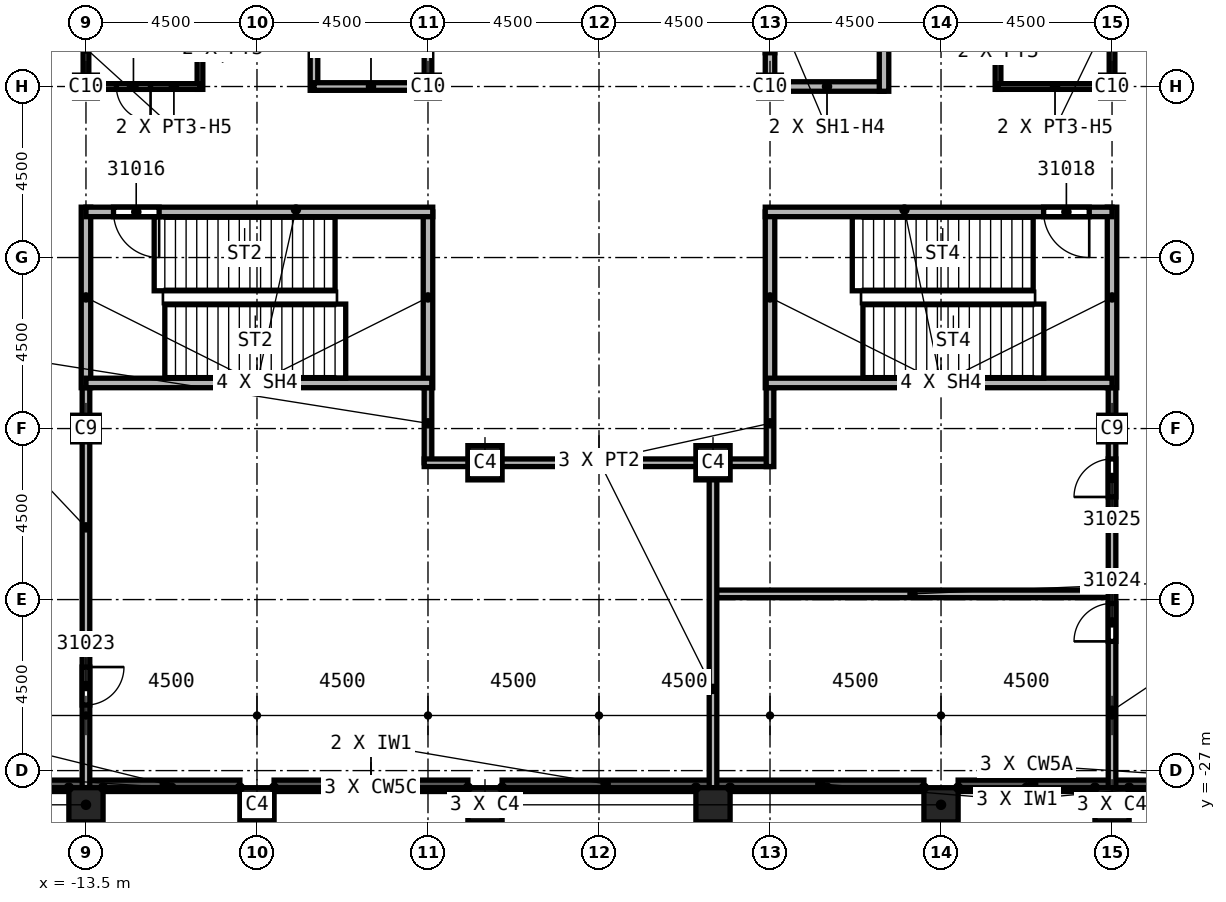
"""IFC4 building model, lengths in metres.
Left out: names, types, materials, properties, quantities, classifications, styles, units other than length and angle.
Written with IfcOpenShell. Run it as: python <this file> out.ifc"""

import sys

from ifc_helpers import new_model, si_unit, direction, frame, frame_2d, origin, origin_2d, place, context, subcontext, project, spatial, rectangle, extrude, element, fill, save


model = new_model("IFC4")
c1 = context("Model", 3, precision=1e-05, world=origin(), true_north=direction((0.0, 1.0)))
c2 = subcontext(c1, "Body", "Model", "MODEL_VIEW")
j1 = project(units=[si_unit("LENGTHUNIT", "METRE"), si_unit("PLANEANGLEUNIT", "RADIAN")], contexts=[c1])
p1 = place(None, origin())
s1 = spatial("IfcSite", under=j1, at=p1, CompositionType="ELEMENT")
p2 = place(p1, origin())
s2 = spatial("IfcBuilding", under=s1, at=p2, CompositionType="ELEMENT")
p3 = place(p2, frame((0.0, 0.0, 350.0)))
s3 = spatial("IfcBuildingStorey", under=s2, at=p3, CompositionType="ELEMENT", Elevation=350.0)
for number, where, z_axis, x_axis in (
    (1, (13.5, -18.0, 0.0), (0.0, 0.0, 1.0), (1.0, 0.0, 0.0)),
    (2, (-13.5, -18.0, 0.0), (0.0, 0.0, 1.0), (1.0, 0.0, 0.0)),
):
    element("IfcColumn", number, at=place(p3, frame(where, z_axis=z_axis, x_axis=x_axis)), inside=s3, PredefinedType="COLUMN", context=c2, shape_type="SweptSolid", body=[
        extrude(rectangle(XDim=0.7, YDim=0.7, at=origin_2d()), origin(), (0.0, 0.0, 1.0), 5.6),
    ])
for number, where, z_axis, x_axis in (
    (3, (4.5, -9.0, 0.0), (0.0, 0.0, 1.0), (1.0, 0.0, 0.0)),
    (4, (13.5, -9.0, 0.0), (0.0, 0.0, 1.0), (1.0, 0.0, 0.0)),
    (5, (-4.5, -9.0, 0.0), (0.0, 0.0, 1.0), (1.0, 0.0, 0.0)),
    (6, (-13.5, -9.0, 0.0), (0.0, 0.0, 1.0), (1.0, 0.0, 0.0)),
):
    element("IfcColumn", number, at=place(p3, frame(where, z_axis=z_axis, x_axis=x_axis)), inside=s3, PredefinedType="COLUMN", context=c2, shape_type="SweptSolid", body=[
        extrude(rectangle(XDim=0.6, YDim=0.6, at=origin_2d()), origin(), (0.0, 0.0, 1.0), 5.6),
    ])
for number, where, z_axis, x_axis in (
    (7, (3.0, -27.9, 0.0), (0.0, 0.0, 1.0), (1.0, 0.0, 0.0)),
    (8, (9.0, -27.9, 0.0), (0.0, 0.0, 1.0), (1.0, 0.0, 0.0)),
    (9, (13.5, -27.9, 0.0), (0.0, 0.0, 1.0), (1.0, 0.0, 0.0)),
    (10, (-3.0, -27.9, 0.0), (0.0, 0.0, 1.0), (1.0, 0.0, 0.0)),
    (11, (-9.0, -27.9, 0.0), (0.0, 0.0, 1.0), (1.0, 0.0, 0.0)),
    (12, (-13.5, -27.9, 0.0), (0.0, 0.0, 1.0), (1.0, 0.0, 0.0)),
    (13, (3.0, -18.9, 0.0), (0.0, 0.0, 1.0), (1.0, 0.0, 0.0)),
    (14, (-3.0, -18.9, 0.0), (0.0, 0.0, 1.0), (1.0, 0.0, 0.0)),
):
    element("IfcColumn", number, at=place(p3, frame(where, z_axis=z_axis, x_axis=x_axis)), inside=s3, PredefinedType="COLUMN", context=c2, shape_type="SweptSolid", body=[
        extrude(rectangle(XDim=0.9, YDim=0.9, at=origin_2d()), origin(), (0.0, 0.0, 1.0), 5.6),
    ])
for number, where, z_axis, x_axis in (
    (15, (-17.55, -27.4, 0.0), (0.0, 0.0, 1.0), (1.0, 0.0, 0.0)),
    (16, (-13.45, -27.4, 0.0), (0.0, 0.0, 1.0), (1.0, 0.0, 0.0)),
):
    element("IfcWall", number, at=place(p3, frame(where, z_axis=z_axis, x_axis=x_axis)), inside=s3, PredefinedType="SOLIDWALL", context=c2, shape_type="SweptSolid", body=[
        extrude(rectangle(XDim=4.0, YDim=0.3, at=frame_2d((2.0, 0.0))), origin(), (0.0, 0.0, 1.0), 1.1),
    ])
p4 = place(p3, frame((-8.55, -27.4, 0.0), z_axis=(0.0, 0.0, 1.0), x_axis=(1.0, 0.0, 0.0)))
e17 = element("IfcWall", 17, at=p4, inside=s3, PredefinedType="SOLIDWALL", context=c2, shape_type="SweptSolid", body=[
    extrude(rectangle(XDim=5.1, YDim=0.3, at=frame_2d((2.55, 0.0))), origin(), (0.0, 0.0, 1.0), 1.1),
])
for number, where, z_axis, x_axis in (
    (18, (-2.55, -27.4, 0.0), (0.0, 0.0, 1.0), (1.0, 0.0, 0.0)),
    (19, (3.05, -27.4, 0.0), (0.0, 0.0, 1.0), (1.0, 0.0, 0.0)),
):
    element("IfcWall", number, at=place(p3, frame(where, z_axis=z_axis, x_axis=x_axis)), inside=s3, PredefinedType="SOLIDWALL", context=c2, shape_type="SweptSolid", body=[
        extrude(rectangle(XDim=5.5, YDim=0.3, at=frame_2d((2.75, 0.0))), origin(), (0.0, 0.0, 1.0), 1.1),
    ])
for number, where, z_axis, x_axis in (
    (20, (9.45, -27.4, 0.0), (0.0, 0.0, 1.0), (1.0, 0.0, 0.0)),
    (21, (13.55, -27.4, 0.0), (0.0, 0.0, 1.0), (1.0, 0.0, 0.0)),
):
    element("IfcWall", number, at=place(p3, frame(where, z_axis=z_axis, x_axis=x_axis)), inside=s3, PredefinedType="SOLIDWALL", context=c2, shape_type="SweptSolid", body=[
        extrude(rectangle(XDim=4.0, YDim=0.3, at=frame_2d((2.0, 0.0))), origin(), (0.0, 0.0, 1.0), 1.1),
    ])
p5 = place(p3, frame((-13.5, -16.675, 0.0), z_axis=(0.0, 0.0, 1.0), x_axis=(0.0, -1.0, 0.0)))
e22 = element("IfcWall", 22, at=p5, inside=s3, PredefinedType="PARTITIONING", context=c2, shape_type="SweptSolid", body=[
    extrude(rectangle(XDim=10.775, YDim=0.2, at=frame_2d((5.387, 0.0))), origin(), (0.0, 0.0, 1.0), 5.6),
])
p6 = place(p5, frame((7.6, 0.0, 0.0)))
e23 = element("IfcOpeningElement", 23, at=p6, cuts=e22, PredefinedType="OPENING", context=c2, shape_type="SweptSolid", body=[
    extrude(rectangle(XDim=1.0, YDim=2.1, at=frame_2d((0.5, 1.05))), frame((0.0, 0.1, 0.0), z_axis=(0.0, -1.0, 0.0), x_axis=(1.0, 0.0, 0.0)), (0.0, 0.0, 1.0), 0.2),
])
p7 = place(p3, frame((-4.5, -18.9, 0.0), z_axis=(0.0, 0.0, 1.0), x_axis=(0.0, 1.0, 0.0)))
e24 = element("IfcWall", 24, at=p7, inside=s3, PredefinedType="PARTITIONING", context=c2, shape_type="SweptSolid", body=[
    extrude(rectangle(XDim=2.1, YDim=0.2, at=frame_2d((1.05, 0.0))), origin(), (0.0, 0.0, 1.0), 5.6),
])
p8 = place(p3, frame((4.5, -18.9, 0.0), z_axis=(0.0, 0.0, 1.0), x_axis=(-1.0, 0.0, 0.0)))
e25 = element("IfcWall", 25, at=p8, inside=s3, PredefinedType="PARTITIONING", context=c2, shape_type="SweptSolid", body=[
    extrude(rectangle(XDim=9.1, YDim=0.2, at=frame_2d((4.55, 0.0))), origin(), (0.0, 0.0, 1.0), 5.6),
])
p9 = place(p3, frame((3.0, -22.35, 0.0), z_axis=(0.0, 0.0, 1.0), x_axis=(1.0, 0.0, 0.0)))
e26 = element("IfcWall", 26, at=p9, inside=s3, PredefinedType="PARTITIONING", context=c2, shape_type="SweptSolid", body=[
    extrude(rectangle(XDim=10.5, YDim=0.2, at=frame_2d((5.25, 0.0))), origin(), (0.0, 0.0, 1.0), 5.6),
])
p10 = place(p3, frame((3.0, -18.9, 0.0), z_axis=(0.0, 0.0, 1.0), x_axis=(0.0, -1.0, 0.0)))
e27 = element("IfcWall", 27, at=p10, inside=s3, PredefinedType="PARTITIONING", context=c2, shape_type="SweptSolid", body=[
    extrude(rectangle(XDim=8.55, YDim=0.2, at=frame_2d((4.275, 0.0))), origin(), (0.0, 0.0, 1.0), 5.6),
])
p11 = place(p3, frame((4.5, -16.8, 0.0), z_axis=(0.0, 0.0, 1.0), x_axis=(0.0, -1.0, 0.0)))
e28 = element("IfcWall", 28, at=p11, inside=s3, PredefinedType="PARTITIONING", context=c2, shape_type="SweptSolid", body=[
    extrude(rectangle(XDim=2.2, YDim=0.2, at=frame_2d((1.1, 0.0))), origin(), (0.0, 0.0, 1.0), 5.6),
])
p12 = place(p3, frame((13.5, -27.45, 0.0), z_axis=(0.0, 0.0, 1.0), x_axis=(0.0, 1.0, 0.0)))
e29 = element("IfcWall", 29, at=p12, inside=s3, PredefinedType="PARTITIONING", context=c2, shape_type="SweptSolid", body=[
    extrude(rectangle(XDim=10.775, YDim=0.2, at=frame_2d((5.387, 0.0))), origin(), (0.0, 0.0, 1.0), 5.6),
])
p13 = place(p12, frame((3.85, 0.0, 0.0)))
e30 = element("IfcOpeningElement", 30, at=p13, cuts=e29, PredefinedType="OPENING", context=c2, shape_type="SweptSolid", body=[
    extrude(rectangle(XDim=1.0, YDim=2.1, at=frame_2d((0.5, 1.05))), frame((0.0, 0.1, 0.0), z_axis=(0.0, -1.0, 0.0), x_axis=(1.0, 0.0, 0.0)), (0.0, 0.0, 1.0), 0.2),
])
p14 = place(p12, frame((7.65, 0.0, 0.0)))
e31 = element("IfcOpeningElement", 31, at=p14, cuts=e29, PredefinedType="OPENING", context=c2, shape_type="SweptSolid", body=[
    extrude(rectangle(XDim=1.0, YDim=2.1, at=frame_2d((0.5, 1.05))), frame((0.0, 0.1, 0.0), z_axis=(0.0, -1.0, 0.0), x_axis=(1.0, 0.0, 0.0)), (0.0, 0.0, 1.0), 0.2),
])
p15 = place(p3, frame((-7.5, -9.1, 0.0), z_axis=(0.0, 0.0, 1.0), x_axis=(0.0, 1.0, 0.0)))
e32 = element("IfcWall", 32, at=p15, inside=s3, PredefinedType="SOLIDWALL", context=c2, shape_type="SweptSolid", body=[
    extrude(rectangle(XDim=6.225, YDim=0.2, at=frame_2d((3.113, 0.0))), origin(), (0.0, 0.0, 1.0), 5.6),
])
p16 = place(p3, frame((-4.5, -9.0, 0.0), z_axis=(0.0, 0.0, 1.0), x_axis=(-1.0, 0.0, 0.0)))
e33 = element("IfcWall", 33, at=p16, inside=s3, PredefinedType="SOLIDWALL", context=c2, shape_type="SweptSolid", body=[
    extrude(rectangle(XDim=3.0, YDim=0.2, at=frame_2d((1.5, 0.0))), origin(), (0.0, 0.0, 1.0), 4.838),
])
p17 = place(p3, frame((-4.5, 6.0, 0.0), z_axis=(0.0, 0.0, 1.0), x_axis=(0.0, -1.0, 0.0)))
e34 = element("IfcWall", 34, at=p17, inside=s3, PredefinedType="SOLIDWALL", context=c2, shape_type="SweptSolid", body=[
    extrude(rectangle(XDim=15.1, YDim=0.2, at=frame_2d((7.55, 0.0))), origin(), (0.0, 0.0, 1.0), 4.838),
])
p18 = place(p17, frame((7.3, 0.0, 0.0)))
e35 = element("IfcOpeningElement", 35, at=p18, cuts=e34, PredefinedType="OPENING", context=c2, shape_type="SweptSolid", body=[
    extrude(rectangle(XDim=1.1, YDim=2.1, at=frame_2d((0.55, 1.05))), frame((0.0, 0.1, 0.0), z_axis=(0.0, -1.0, 0.0), x_axis=(1.0, 0.0, 0.0)), (0.0, 0.0, 1.0), 0.2),
])
p19 = place(p17, frame((4.0, 0.0, 0.0)))
e36 = element("IfcOpeningElement", 36, at=p19, cuts=e34, PredefinedType="OPENING", context=c2, shape_type="SweptSolid", body=[
    extrude(rectangle(XDim=1.1, YDim=2.1, at=frame_2d((0.55, 1.05))), frame((0.0, 0.1, 0.0), z_axis=(0.0, -1.0, 0.0), x_axis=(1.0, 0.0, 0.0)), (0.0, 0.0, 1.0), 0.2),
])
p20 = place(p3, frame((4.5, -9.125, 0.0), z_axis=(0.0, 0.0, 1.0), x_axis=(0.0, 1.0, 0.0)))
e37 = element("IfcWall", 37, at=p20, inside=s3, PredefinedType="SOLIDWALL", context=c2, shape_type="SweptSolid", body=[
    extrude(rectangle(XDim=3.125, YDim=0.25, at=frame_2d((1.562, 0.0))), origin(), (0.0, 0.0, 1.0), 4.838),
])
p21 = place(p20, frame((1.012, 0.0, 0.0)))
e38 = element("IfcOpeningElement", 38, at=p21, cuts=e37, PredefinedType="OPENING", context=c2, shape_type="SweptSolid", body=[
    extrude(rectangle(XDim=1.1, YDim=2.1, at=frame_2d((0.55, 1.05))), frame((0.0, 0.125, 0.0), z_axis=(0.0, -1.0, 0.0), x_axis=(1.0, 0.0, 0.0)), (0.0, 0.0, 1.0), 0.25),
])
p22 = place(p3, frame((7.5, -9.0, 0.0), z_axis=(0.0, 0.0, 1.0), x_axis=(-1.0, 0.0, 0.0)))
e39 = element("IfcWall", 39, at=p22, inside=s3, PredefinedType="SOLIDWALL", context=c2, shape_type="SweptSolid", body=[
    extrude(rectangle(XDim=3.0, YDim=0.25, at=frame_2d((1.5, 0.0))), origin(), (0.0, 0.0, 1.0), 4.838),
])
p23 = place(p3, frame((7.5, -6.0, 0.0), z_axis=(0.0, 0.0, 1.0), x_axis=(0.0, -1.0, 0.0)))
e40 = element("IfcWall", 40, at=p23, inside=s3, PredefinedType="SOLIDWALL", context=c2, shape_type="SweptSolid", body=[
    extrude(rectangle(XDim=3.125, YDim=0.25, at=frame_2d((1.562, 0.0))), origin(), (0.0, 0.0, 1.0), 5.6),
])
p24 = place(p3, frame((-13.5, -12.175, 0.0), z_axis=(0.0, 0.0, 1.0), x_axis=(0.0, -1.0, 0.0)))
e41 = element("IfcWall", 41, at=p24, inside=s3, PredefinedType="SOLIDWALL", context=c2, shape_type="SweptSolid", body=[
    extrude(rectangle(XDim=4.75, YDim=0.25, at=frame_2d((2.375, 0.0))), origin(), (0.0, 0.0, 1.0), 5.6),
])
p25 = place(p3, frame((-4.5, -12.3, 0.0), z_axis=(0.0, 0.0, 1.0), x_axis=(0.0, -1.0, 0.0)))
e42 = element("IfcWall", 42, at=p25, inside=s3, PredefinedType="SOLIDWALL", context=c2, shape_type="SweptSolid", body=[
    extrude(rectangle(XDim=4.625, YDim=0.25, at=frame_2d((2.312, 0.0))), origin(), (0.0, 0.0, 1.0), 5.6),
])
p26 = place(p3, frame((-4.4, -16.8, 0.0), z_axis=(0.0, 0.0, 1.0), x_axis=(-1.0, 0.0, 0.0)))
e43 = element("IfcWall", 43, at=p26, inside=s3, PredefinedType="SOLIDWALL", context=c2, shape_type="SweptSolid", body=[
    extrude(rectangle(XDim=9.1, YDim=0.25, at=frame_2d((4.55, 0.0))), origin(), (0.0, 0.0, 1.0), 5.6),
])
p27 = place(p3, frame((-4.375, -12.3, 0.0), z_axis=(0.0, 0.0, 1.0), x_axis=(-1.0, 0.0, 0.0)))
e44 = element("IfcWall", 44, at=p27, inside=s3, PredefinedType="SOLIDWALL", context=c2, shape_type="SweptSolid", body=[
    extrude(rectangle(XDim=9.125, YDim=0.25, at=frame_2d((4.562, 0.0))), origin(), (0.0, 0.0, 1.0), 5.6),
])
p28 = place(p27, frame((7.2, 0.0, 0.0)))
e45 = element("IfcOpeningElement", 45, at=p28, cuts=e44, PredefinedType="OPENING", context=c2, shape_type="SweptSolid", body=[
    extrude(rectangle(XDim=1.2, YDim=2.1, at=frame_2d((0.6, 1.05))), frame((0.0, 0.125, 0.0), z_axis=(0.0, -1.0, 0.0), x_axis=(1.0, 0.0, 0.0)), (0.0, 0.0, 1.0), 0.25),
])
p29 = place(p3, frame((4.5, -16.925, 0.0), z_axis=(0.0, 0.0, 1.0), x_axis=(0.0, 1.0, 0.0)))
e46 = element("IfcWall", 46, at=p29, inside=s3, PredefinedType="SOLIDWALL", context=c2, shape_type="SweptSolid", body=[
    extrude(rectangle(XDim=4.625, YDim=0.25, at=frame_2d((2.312, 0.0))), origin(), (0.0, 0.0, 1.0), 5.6),
])
p30 = place(p3, frame((13.5, -16.925, 0.0), z_axis=(0.0, 0.0, 1.0), x_axis=(0.0, 1.0, 0.0)))
e47 = element("IfcWall", 47, at=p30, inside=s3, PredefinedType="SOLIDWALL", context=c2, shape_type="SweptSolid", body=[
    extrude(rectangle(XDim=4.75, YDim=0.25, at=frame_2d((2.375, 0.0))), origin(), (0.0, 0.0, 1.0), 5.6),
])
p31 = place(p3, frame((13.5, -16.8, 0.0), z_axis=(0.0, 0.0, 1.0), x_axis=(-1.0, 0.0, 0.0)))
e48 = element("IfcWall", 48, at=p31, inside=s3, PredefinedType="SOLIDWALL", context=c2, shape_type="SweptSolid", body=[
    extrude(rectangle(XDim=9.1, YDim=0.25, at=frame_2d((4.55, 0.0))), origin(), (0.0, 0.0, 1.0), 5.6),
])
p32 = place(p3, frame((13.5, -12.3, 0.0), z_axis=(0.0, 0.0, 1.0), x_axis=(-1.0, 0.0, 0.0)))
e49 = element("IfcWall", 49, at=p32, inside=s3, PredefinedType="SOLIDWALL", context=c2, shape_type="SweptSolid", body=[
    extrude(rectangle(XDim=9.125, YDim=0.25, at=frame_2d((4.562, 0.0))), origin(), (0.0, 0.0, 1.0), 5.6),
])
p33 = place(p32, frame((0.6, 0.0, 0.0)))
e50 = element("IfcOpeningElement", 50, at=p33, cuts=e49, PredefinedType="OPENING", context=c2, shape_type="SweptSolid", body=[
    extrude(rectangle(XDim=1.2, YDim=2.1, at=frame_2d((0.6, 1.05))), frame((0.0, 0.125, 0.0), z_axis=(0.0, -1.0, 0.0), x_axis=(1.0, 0.0, 0.0)), (0.0, 0.0, 1.0), 0.25),
])
p34 = place(p3, frame((-13.5, -9.075, 0.0), z_axis=(0.0, 0.0, 1.0), x_axis=(0.0, 1.0, 0.0)))
e51 = element("IfcWall", 51, at=p34, inside=s3, PredefinedType="PARTITIONING", context=c2, shape_type="SweptSolid", body=[
    extrude(rectangle(XDim=2.075, YDim=0.15, at=frame_2d((1.038, 0.0))), origin(), (0.0, 0.0, 1.0), 4.838),
])
p35 = place(p3, frame((-10.5, -9.075, 0.0), z_axis=(0.0, 0.0, 1.0), x_axis=(0.0, 1.0, 0.0)))
e52 = element("IfcWall", 52, at=p35, inside=s3, PredefinedType="PARTITIONING", context=c2, shape_type="SweptSolid", body=[
    extrude(rectangle(XDim=2.15, YDim=0.15, at=frame_2d((1.075, 0.0))), origin(), (0.0, 0.0, 1.0), 5.6),
])
p36 = place(p3, frame((-10.5, -9.0, 0.0), z_axis=(0.0, 0.0, 1.0), x_axis=(-1.0, 0.0, 0.0)))
e53 = element("IfcWall", 53, at=p36, inside=s3, PredefinedType="PARTITIONING", context=c2, shape_type="SweptSolid", body=[
    extrude(rectangle(XDim=3.0, YDim=0.15, at=frame_2d((1.5, 0.0))), origin(), (0.0, 0.0, 1.0), 4.838),
])
p37 = place(p36, frame((1.3, 0.0, 0.0)))
e54 = element("IfcOpeningElement", 54, at=p37, cuts=e53, PredefinedType="OPENING", context=c2, shape_type="SweptSolid", body=[
    extrude(rectangle(XDim=0.9, YDim=2.1, at=frame_2d((0.45, 1.05))), frame((0.0, 0.075, 0.0), z_axis=(0.0, -1.0, 0.0), x_axis=(1.0, 0.0, 0.0)), (0.0, 0.0, 1.0), 0.15),
])
p38 = place(p3, frame((10.5, -4.925, 0.0), z_axis=(0.0, 0.0, 1.0), x_axis=(0.0, -1.0, 0.0)))
e55 = element("IfcWall", 55, at=p38, inside=s3, PredefinedType="PARTITIONING", context=c2, shape_type="SweptSolid", body=[
    extrude(rectangle(XDim=4.15, YDim=0.15, at=frame_2d((2.075, 0.0))), origin(), (0.0, 0.0, 1.0), 5.6),
])
p39 = place(p38, frame((0.25, 0.0, 0.0)))
e56 = element("IfcOpeningElement", 56, at=p39, cuts=e55, PredefinedType="OPENING", context=c2, shape_type="SweptSolid", body=[
    extrude(rectangle(XDim=0.9, YDim=2.1, at=frame_2d((0.45, 1.05))), frame((0.0, 0.075, 0.0), z_axis=(0.0, -1.0, 0.0), x_axis=(1.0, 0.0, 0.0)), (0.0, 0.0, 1.0), 0.15),
])
p40 = place(p3, frame((13.5, -9.0, 0.0), z_axis=(0.0, 0.0, 1.0), x_axis=(-1.0, 0.0, 0.0)))
e57 = element("IfcWall", 57, at=p40, inside=s3, PredefinedType="PARTITIONING", context=c2, shape_type="SweptSolid", body=[
    extrude(rectangle(XDim=3.0, YDim=0.15, at=frame_2d((1.5, 0.0))), origin(), (0.0, 0.0, 1.0), 4.838),
])
p41 = place(p3, frame((13.5, -5.0, 0.0), z_axis=(0.0, 0.0, 1.0), x_axis=(0.0, -1.0, 0.0)))
e58 = element("IfcWall", 58, at=p41, inside=s3, PredefinedType="PARTITIONING", context=c2, shape_type="SweptSolid", body=[
    extrude(rectangle(XDim=4.075, YDim=0.15, at=frame_2d((2.038, 0.0))), origin(), (0.0, 0.0, 1.0), 4.838),
])
p42 = place(p37, origin())
e59 = element("IfcDoor", 59, at=p42, inside=s3, OperationType="SINGLE_SWING_RIGHT", PredefinedType="DOOR", context=c2, shape_type="SweptSolid", body=[
    extrude(rectangle(XDim=0.9, YDim=2.1, at=frame_2d((0.45, 1.05))), frame((0.0, 0.025, 0.0), z_axis=(0.0, -1.0, 0.0), x_axis=(1.0, 0.0, 0.0)), (0.0, 0.0, 1.0), 0.05),
])
fill(e54, e59)
p43 = place(p28, origin())
e60 = element("IfcDoor", 60, at=p43, inside=s3, OperationType="SINGLE_SWING_LEFT", PredefinedType="DOOR", context=c2, shape_type="SweptSolid", body=[
    extrude(rectangle(XDim=1.2, YDim=2.1, at=frame_2d((0.6, 1.05))), frame((0.0, 0.025, 0.0), z_axis=(0.0, -1.0, 0.0), x_axis=(1.0, 0.0, 0.0)), (0.0, 0.0, 1.0), 0.05),
])
fill(e45, e60)
p44 = place(p33, origin())
e61 = element("IfcDoor", 61, at=p44, inside=s3, OperationType="SINGLE_SWING_LEFT", PredefinedType="DOOR", context=c2, shape_type="SweptSolid", body=[
    extrude(rectangle(XDim=1.2, YDim=2.1, at=frame_2d((0.6, 1.05))), frame((0.0, 0.025, 0.0), z_axis=(0.0, -1.0, 0.0), x_axis=(1.0, 0.0, 0.0)), (0.0, 0.0, 1.0), 0.05),
])
fill(e50, e61)
p45 = place(p6, origin())
e62 = element("IfcDoor", 62, at=p45, inside=s3, OperationType="SINGLE_SWING_RIGHT", PredefinedType="DOOR", context=c2, shape_type="SweptSolid", body=[
    extrude(rectangle(XDim=1.0, YDim=2.1, at=frame_2d((0.5, 1.05))), frame((0.0, 0.025, 0.0), z_axis=(0.0, -1.0, 0.0), x_axis=(1.0, 0.0, 0.0)), (0.0, 0.0, 1.0), 0.05),
])
fill(e23, e62)
p46 = place(p13, origin())
e63 = element("IfcDoor", 63, at=p46, inside=s3, OperationType="SINGLE_SWING_LEFT", PredefinedType="DOOR", context=c2, shape_type="SweptSolid", body=[
    extrude(rectangle(XDim=1.0, YDim=2.1, at=frame_2d((0.5, 1.05))), frame((0.0, 0.025, 0.0), z_axis=(0.0, -1.0, 0.0), x_axis=(1.0, 0.0, 0.0)), (0.0, 0.0, 1.0), 0.05),
])
fill(e30, e63)
p47 = place(p14, origin())
e64 = element("IfcDoor", 64, at=p47, inside=s3, OperationType="SINGLE_SWING_RIGHT", PredefinedType="DOOR", context=c2, shape_type="SweptSolid", body=[
    extrude(rectangle(XDim=1.0, YDim=2.1, at=frame_2d((0.5, 1.05))), frame((0.0, 0.025, 0.0), z_axis=(0.0, -1.0, 0.0), x_axis=(1.0, 0.0, 0.0)), (0.0, 0.0, 1.0), 0.05),
])
fill(e31, e64)
p48 = place(p21, origin())
e65 = element("IfcDoor", 65, at=p48, inside=s3, OperationType="SLIDING_TO_LEFT", PredefinedType="DOOR", context=c2, shape_type="SweptSolid", body=[
    extrude(rectangle(XDim=1.1, YDim=2.1, at=frame_2d((0.55, 1.05))), frame((0.0, 0.025, 0.0), z_axis=(0.0, -1.0, 0.0), x_axis=(1.0, 0.0, 0.0)), (0.0, 0.0, 1.0), 0.05),
])
fill(e38, e65)
save(model, sys.argv[1])
